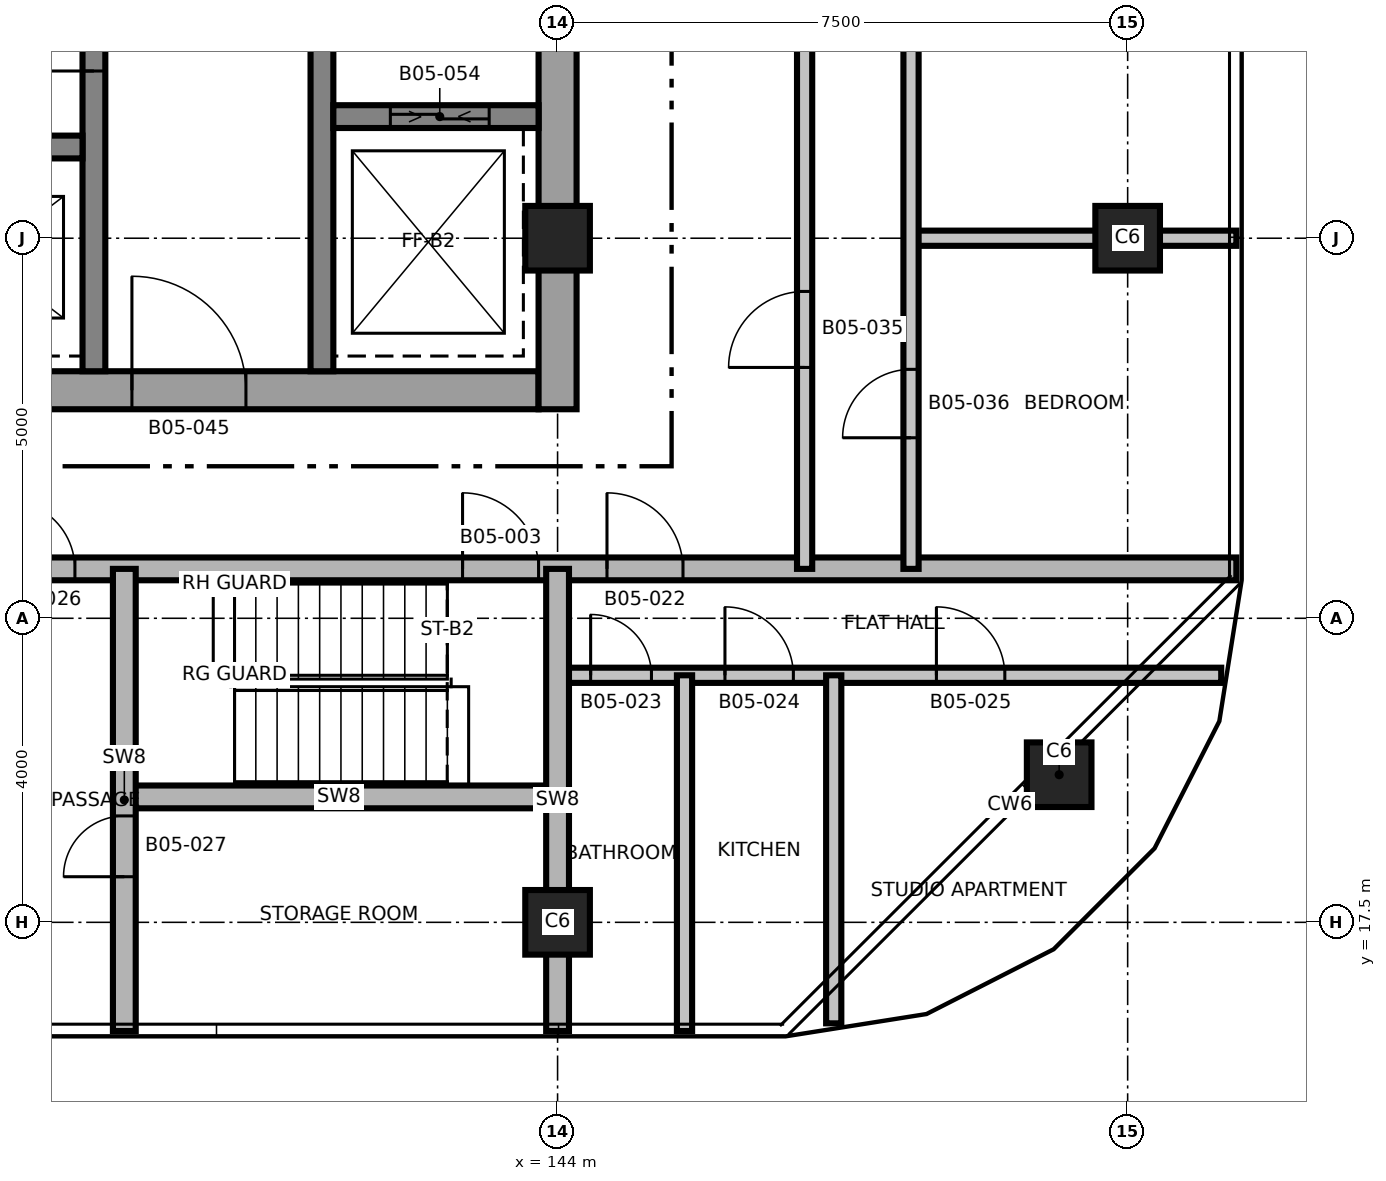
"""IFC4 building model, lengths in metres.
Left out: names, types, materials, properties, quantities, classifications, styles, units other than length and angle.
Written with IfcOpenShell. Run it as: python <this file> out.ifc"""

import sys

from ifc_helpers import new_model, si_unit, direction, frame, frame_2d, origin, origin_2d, place, context, subcontext, project, spatial, rectangle, extrude, element, fill, save


model = new_model("IFC4")
c1 = context("Model", 3, precision=1e-05, world=origin(), true_north=direction((0.0, 1.0)))
c2 = subcontext(c1, "Body", "Model", "MODEL_VIEW")
j1 = project(units=[si_unit("LENGTHUNIT", "METRE"), si_unit("PLANEANGLEUNIT", "RADIAN")], contexts=[c1])
p1 = place(None, origin())
s1 = spatial("IfcSite", under=j1, at=p1, CompositionType="ELEMENT")
p2 = place(p1, origin())
s2 = spatial("IfcBuilding", under=s1, at=p2, CompositionType="ELEMENT")
p3 = place(p2, frame((0.0, 0.0, 74.2)))
s3 = spatial("IfcBuildingStorey", under=s2, at=p3, CompositionType="ELEMENT", Elevation=74.2)
p4 = place(p3, frame((128.75, 24.5, 0.0), z_axis=(0.0, 0.0, 1.0), x_axis=(1.0, 0.0, 0.0)))
e1 = element("IfcWall", 1, at=p4, inside=s3, PredefinedType="SHEAR", context=c2, shape_type="SweptSolid", body=[
    extrude(rectangle(XDim=15.0, YDim=0.5, at=frame_2d((7.5, 0.0))), origin(), (0.0, 0.0, 1.0), 3.7),
])
p5 = place(p4, frame((9.65, 0.0, 0.0)))
e2 = element("IfcOpeningElement", 2, at=p5, cuts=e1, PredefinedType="OPENING", context=c2, shape_type="SweptSolid", body=[
    extrude(rectangle(XDim=1.5, YDim=2.1, at=frame_2d((0.75, 1.05))), frame((0.0, 0.26, 0.0), z_axis=(0.0, -1.0, 0.0), x_axis=(1.0, 0.0, 0.0)), (0.0, 0.0, 1.0), 0.52),
])
p6 = place(p4, frame((1.25, 0.0, 0.0)))
e3 = element("IfcOpeningElement", 3, at=p6, cuts=e1, PredefinedType="OPENING", context=c2, shape_type="SweptSolid", body=[
    extrude(rectangle(XDim=0.9, YDim=2.1, at=frame_2d((0.45, 1.05))), frame((0.0, 0.26, 0.0), z_axis=(0.0, -1.0, 0.0), x_axis=(1.0, 0.0, 0.0)), (0.0, 0.0, 1.0), 0.52),
])
p7 = place(p3, frame((144.0, 24.25, 0.0), z_axis=(0.0, 0.0, 1.0), x_axis=(0.0, 1.0, 0.0)))
e4 = element("IfcWall", 4, at=p7, inside=s3, PredefinedType="SHEAR", context=c2, shape_type="SweptSolid", body=[
    extrude(rectangle(XDim=13.5, YDim=0.5, at=frame_2d((6.75, 0.0))), origin(), (0.0, 0.0, 1.0), 3.7),
])
p8 = place(p3, frame((137.9, 24.75, 0.0), z_axis=(0.0, 0.0, 1.0), x_axis=(0.0, 1.0, 0.0)))
e5 = element("IfcWall", 5, at=p8, inside=s3, PredefinedType="SHEAR", context=c2, shape_type="SweptSolid", body=[
    extrude(rectangle(XDim=12.5, YDim=0.3, at=frame_2d((6.25, 0.0))), origin(), (0.0, 0.0, 1.0), 3.7),
])
p9 = place(p8, frame((3.95, 0.0, 0.0)))
e6 = element("IfcOpeningElement", 6, at=p9, cuts=e5, PredefinedType="OPENING", context=c2, shape_type="SweptSolid", body=[
    extrude(rectangle(XDim=1.5, YDim=2.1, at=frame_2d((0.75, 1.05))), frame((0.0, 0.16, 0.0), z_axis=(0.0, -1.0, 0.0), x_axis=(1.0, 0.0, 0.0)), (0.0, 0.0, 1.0), 0.32),
])
p10 = place(p8, frame((10.45, 0.0, 0.0)))
e7 = element("IfcOpeningElement", 7, at=p10, cuts=e5, PredefinedType="OPENING", context=c2, shape_type="SweptSolid", body=[
    extrude(rectangle(XDim=0.9, YDim=2.1, at=frame_2d((0.45, 1.05))), frame((0.0, 0.16, 0.0), z_axis=(0.0, -1.0, 0.0), x_axis=(1.0, 0.0, 0.0)), (0.0, 0.0, 1.0), 0.32),
])
p11 = place(p3, frame((140.9, 24.75, 0.0), z_axis=(0.0, 0.0, 1.0), x_axis=(0.0, 1.0, 0.0)))
e8 = element("IfcWall", 8, at=p11, inside=s3, PredefinedType="SHEAR", context=c2, shape_type="SweptSolid", body=[
    extrude(rectangle(XDim=12.5, YDim=0.3, at=frame_2d((6.25, 0.0))), origin(), (0.0, 0.0, 1.0), 3.7),
])
p12 = place(p11, frame((5.9, 0.0, 0.0)))
e9 = element("IfcOpeningElement", 9, at=p12, cuts=e8, PredefinedType="OPENING", context=c2, shape_type="SweptSolid", body=[
    extrude(rectangle(XDim=1.2, YDim=2.1, at=frame_2d((0.6, 1.05))), frame((0.0, 0.16, 0.0), z_axis=(0.0, -1.0, 0.0), x_axis=(1.0, 0.0, 0.0)), (0.0, 0.0, 1.0), 0.32),
])
p13 = place(p3, frame((132.25, 27.7, 0.0), z_axis=(0.0, 0.0, 1.0), x_axis=(1.0, 0.0, 0.0)))
e10 = element("IfcWall", 10, at=p13, inside=s3, PredefinedType="SHEAR", context=c2, shape_type="SweptSolid", body=[
    extrude(rectangle(XDim=5.5, YDim=0.3, at=frame_2d((2.75, 0.0))), origin(), (0.0, 0.0, 1.0), 3.7),
])
p14 = place(p13, frame((0.9, 0.0, 0.0)))
e11 = element("IfcOpeningElement", 11, at=p14, cuts=e10, PredefinedType="OPENING", context=c2, shape_type="SweptSolid", body=[
    extrude(rectangle(XDim=1.1, YDim=2.4, at=frame_2d((0.55, 1.2))), frame((0.0, 0.16, 0.0), z_axis=(0.0, -1.0, 0.0), x_axis=(1.0, 0.0, 0.0)), (0.0, 0.0, 1.0), 0.32),
])
p15 = place(p13, frame((3.8, 0.0, 0.0)))
e12 = element("IfcOpeningElement", 12, at=p15, cuts=e10, PredefinedType="OPENING", context=c2, shape_type="SweptSolid", body=[
    extrude(rectangle(XDim=1.1, YDim=2.4, at=frame_2d((0.55, 1.2))), frame((0.0, 0.16, 0.0), z_axis=(0.0, -1.0, 0.0), x_axis=(1.0, 0.0, 0.0)), (0.0, 0.0, 1.0), 0.32),
])
p16 = place(p3, frame((141.05, 28.1, 0.0), z_axis=(0.0, 0.0, 1.0), x_axis=(1.0, 0.0, 0.0)))
e13 = element("IfcWall", 13, at=p16, inside=s3, PredefinedType="SHEAR", context=c2, shape_type="SweptSolid", body=[
    extrude(rectangle(XDim=2.7, YDim=0.3, at=frame_2d((1.35, 0.0))), origin(), (0.0, 0.0, 1.0), 3.7),
])
p17 = place(p16, frame((0.75, 0.0, 0.0)))
e14 = element("IfcOpeningElement", 14, at=p17, cuts=e13, PredefinedType="OPENING", context=c2, shape_type="SweptSolid", body=[
    extrude(rectangle(XDim=1.3, YDim=2.4, at=frame_2d((0.65, 1.2))), frame((0.0, 0.16, 0.0), z_axis=(0.0, -1.0, 0.0), x_axis=(1.0, 0.0, 0.0)), (0.0, 0.0, 1.0), 0.32),
])
for number, where, z_axis, x_axis in (
    (15, (144.0, 17.5, 0.0), (0.0, 0.0, 1.0), (1.0, 0.0, 0.0)),
    (16, (150.599, 19.442, 0.0), (0.0, 0.0, 1.0), (1.0, 0.0, 0.0)),
    (17, (144.0, 26.5, 0.0), (0.0, 0.0, 1.0), (1.0, 0.0, 0.0)),
    (18, (151.5, 26.5, 0.0), (0.0, 0.0, 1.0), (1.0, 0.0, 0.0)),
):
    element("IfcColumn", number, at=place(p3, frame(where, z_axis=z_axis, x_axis=x_axis)), inside=s3, PredefinedType="COLUMN", context=c2, shape_type="SweptSolid", body=[
        extrude(rectangle(XDim=0.85, YDim=0.85, at=origin_2d()), origin(), (0.0, 0.0, 1.0), 3.7),
    ])
p18 = place(p3, frame((138.25, 19.15, 0.0), z_axis=(0.0, 0.0, 1.0), x_axis=(1.0, 0.0, 0.0)))
e19 = element("IfcWall", 19, at=p18, inside=s3, PredefinedType="SHEAR", context=c2, shape_type="SweptSolid", body=[
    extrude(rectangle(XDim=5.75, YDim=0.3, at=frame_2d((2.875, 0.0))), origin(), (0.0, 0.0, 1.0), 3.4),
])
p19 = place(p3, frame((144.0, 20.75, 0.0), z_axis=(0.0, 0.0, 1.0), x_axis=(1.0, 0.0, 0.0)))
e20 = element("IfcWall", 20, at=p19, inside=s3, PredefinedType="PARTITIONING", context=c2, shape_type="SweptSolid", body=[
    extrude(rectangle(XDim=8.731, YDim=0.2, at=frame_2d((4.365, 0.0))), origin(), (0.0, 0.0, 1.0), 3.4),
])
p20 = place(p19, frame((0.435, 0.0, 0.0)))
e21 = element("IfcOpeningElement", 21, at=p20, cuts=e20, PredefinedType="OPENING", context=c2, shape_type="SweptSolid", body=[
    extrude(rectangle(XDim=0.8, YDim=2.1, at=frame_2d((0.4, 1.05))), frame((0.0, 0.11, 0.0), z_axis=(0.0, -1.0, 0.0), x_axis=(1.0, 0.0, 0.0)), (0.0, 0.0, 1.0), 0.22),
])
p21 = place(p19, frame((2.202, 0.0, 0.0)))
e22 = element("IfcOpeningElement", 22, at=p21, cuts=e20, PredefinedType="OPENING", context=c2, shape_type="SweptSolid", body=[
    extrude(rectangle(XDim=0.9, YDim=2.1, at=frame_2d((0.45, 1.05))), frame((0.0, 0.11, 0.0), z_axis=(0.0, -1.0, 0.0), x_axis=(1.0, 0.0, 0.0)), (0.0, 0.0, 1.0), 0.22),
])
p22 = place(p19, frame((4.984, 0.0, 0.0)))
e23 = element("IfcOpeningElement", 23, at=p22, cuts=e20, PredefinedType="OPENING", context=c2, shape_type="SweptSolid", body=[
    extrude(rectangle(XDim=0.9, YDim=2.1, at=frame_2d((0.45, 1.05))), frame((0.0, 0.11, 0.0), z_axis=(0.0, -1.0, 0.0), x_axis=(1.0, 0.0, 0.0)), (0.0, 0.0, 1.0), 0.22),
])
p23 = place(p3, frame((120.07, 22.15, 0.0), z_axis=(0.0, 0.0, 1.0), x_axis=(1.0, 0.0, 0.0)))
e24 = element("IfcWall", 24, at=p23, inside=s3, PredefinedType="SHEAR", context=c2, shape_type="SweptSolid", body=[
    extrude(rectangle(XDim=32.86, YDim=0.3, at=frame_2d((16.43, 0.0))), origin(), (0.0, 0.0, 1.0), 3.4),
])
p24 = place(p23, frame((22.68, 0.0, 0.0)))
e25 = element("IfcOpeningElement", 25, at=p24, cuts=e24, PredefinedType="OPENING", context=c2, shape_type="SweptSolid", body=[
    extrude(rectangle(XDim=1.0, YDim=2.1, at=frame_2d((0.5, 1.05))), frame((0.0, 0.16, 0.0), z_axis=(0.0, -1.0, 0.0), x_axis=(1.0, 0.0, 0.0)), (0.0, 0.0, 1.0), 0.32),
])
p25 = place(p23, frame((11.03, 0.0, 0.0)))
e26 = element("IfcOpeningElement", 26, at=p25, cuts=e24, PredefinedType="OPENING", context=c2, shape_type="SweptSolid", body=[
    extrude(rectangle(XDim=1.0, YDim=2.1, at=frame_2d((0.5, 1.05))), frame((0.0, 0.16, 0.0), z_axis=(0.0, -1.0, 0.0), x_axis=(1.0, 0.0, 0.0)), (0.0, 0.0, 1.0), 0.32),
])
p26 = place(p23, frame((24.58, 0.0, 0.0)))
e27 = element("IfcOpeningElement", 27, at=p26, cuts=e24, PredefinedType="OPENING", context=c2, shape_type="SweptSolid", body=[
    extrude(rectangle(XDim=1.0, YDim=2.1, at=frame_2d((0.5, 1.05))), frame((0.0, 0.16, 0.0), z_axis=(0.0, -1.0, 0.0), x_axis=(1.0, 0.0, 0.0)), (0.0, 0.0, 1.0), 0.32),
])
p27 = place(p23, frame((16.68, 0.0, 0.0)))
e28 = element("IfcOpeningElement", 28, at=p27, cuts=e24, PredefinedType="OPENING", context=c2, shape_type="SweptSolid", body=[
    extrude(rectangle(XDim=0.9, YDim=2.1, at=frame_2d((0.45, 1.05))), frame((0.0, 0.16, 0.0), z_axis=(0.0, -1.0, 0.0), x_axis=(1.0, 0.0, 0.0)), (0.0, 0.0, 1.0), 0.32),
])
p28 = place(p3, frame((148.65, 26.5, 0.0), z_axis=(0.0, 0.0, 1.0), x_axis=(1.0, 0.0, 0.0)))
e29 = element("IfcWall", 29, at=p28, inside=s3, PredefinedType="PARTITIONING", context=c2, shape_type="SweptSolid", body=[
    extrude(rectangle(XDim=4.28, YDim=0.2, at=frame_2d((2.14, 0.0))), origin(), (0.0, 0.0, 1.0), 3.4),
])
p29 = place(p3, frame((138.3, 16.07, 0.0), z_axis=(0.0, 0.0, 1.0), x_axis=(0.0, 1.0, 0.0)))
e30 = element("IfcWall", 30, at=p29, inside=s3, PredefinedType="SHEAR", context=c2, shape_type="SweptSolid", body=[
    extrude(rectangle(XDim=6.08, YDim=0.3, at=frame_2d((3.04, 0.0))), origin(), (0.0, 0.0, 1.0), 3.4),
])
p30 = place(p29, frame((2.03, 0.0, 0.0)))
e31 = element("IfcOpeningElement", 31, at=p30, cuts=e30, PredefinedType="OPENING", context=c2, shape_type="SweptSolid", body=[
    extrude(rectangle(XDim=0.8, YDim=2.1, at=frame_2d((0.4, 1.05))), frame((0.0, 0.16, 0.0), z_axis=(0.0, -1.0, 0.0), x_axis=(1.0, 0.0, 0.0)), (0.0, 0.0, 1.0), 0.32),
])
p31 = place(p3, frame((144.0, 16.07, 0.0), z_axis=(0.0, 0.0, 1.0), x_axis=(0.0, 1.0, 0.0)))
e32 = element("IfcWall", 32, at=p31, inside=s3, PredefinedType="SHEAR", context=c2, shape_type="SweptSolid", body=[
    extrude(rectangle(XDim=6.08, YDim=0.3, at=frame_2d((3.04, 0.0))), origin(), (0.0, 0.0, 1.0), 3.4),
])
p32 = place(p3, frame((145.67, 16.07, 0.0), z_axis=(0.0, 0.0, 1.0), x_axis=(0.0, 1.0, 0.0)))
e33 = element("IfcWall", 33, at=p32, inside=s3, PredefinedType="PARTITIONING", context=c2, shape_type="SweptSolid", body=[
    extrude(rectangle(XDim=4.68, YDim=0.2, at=frame_2d((2.34, 0.0))), origin(), (0.0, 0.0, 1.0), 3.4),
])
p33 = place(p3, frame((147.25, 22.15, 0.0), z_axis=(0.0, 0.0, 1.0), x_axis=(0.0, 1.0, 0.0)))
e34 = element("IfcWall", 34, at=p33, inside=s3, PredefinedType="PARTITIONING", context=c2, shape_type="SweptSolid", body=[
    extrude(rectangle(XDim=17.7, YDim=0.2, at=frame_2d((8.85, 0.0))), origin(), (0.0, 0.0, 1.0), 3.4),
])
p34 = place(p33, frame((2.65, 0.0, 0.0)))
e35 = element("IfcOpeningElement", 35, at=p34, cuts=e34, PredefinedType="OPENING", context=c2, shape_type="SweptSolid", body=[
    extrude(rectangle(XDim=1.0, YDim=2.1, at=frame_2d((0.5, 1.05))), frame((0.0, 0.11, 0.0), z_axis=(0.0, -1.0, 0.0), x_axis=(1.0, 0.0, 0.0)), (0.0, 0.0, 1.0), 0.22),
])
p35 = place(p3, frame((147.633, 16.171, 0.0), z_axis=(0.0, 0.0, 1.0), x_axis=(0.0, 1.0, 0.0)))
e36 = element("IfcWall", 36, at=p35, inside=s3, PredefinedType="PARTITIONING", context=c2, shape_type="SweptSolid", body=[
    extrude(rectangle(XDim=4.579, YDim=0.2, at=frame_2d((2.29, 0.0))), origin(), (0.0, 0.0, 1.0), 3.4),
])
p36 = place(p3, frame((148.65, 22.15, 0.0), z_axis=(0.0, 0.0, 1.0), x_axis=(0.0, 1.0, 0.0)))
e37 = element("IfcWall", 37, at=p36, inside=s3, PredefinedType="PARTITIONING", context=c2, shape_type="SweptSolid", body=[
    extrude(rectangle(XDim=17.7, YDim=0.2, at=frame_2d((8.85, 0.0))), origin(), (0.0, 0.0, 1.0), 3.4),
])
p37 = place(p36, frame((1.725, 0.0, 0.0)))
e38 = element("IfcOpeningElement", 38, at=p37, cuts=e37, PredefinedType="OPENING", context=c2, shape_type="SweptSolid", body=[
    extrude(rectangle(XDim=0.9, YDim=2.1, at=frame_2d((0.45, 1.05))), frame((0.0, 0.11, 0.0), z_axis=(0.0, -1.0, 0.0), x_axis=(1.0, 0.0, 0.0)), (0.0, 0.0, 1.0), 0.22),
])
p38 = place(p36, frame((6.867, 0.0, 0.0)))
e39 = element("IfcOpeningElement", 39, at=p38, cuts=e37, PredefinedType="OPENING", context=c2, shape_type="SweptSolid", body=[
    extrude(rectangle(XDim=0.9, YDim=2.1, at=frame_2d((0.45, 1.05))), frame((0.0, 0.11, 0.0), z_axis=(0.0, -1.0, 0.0), x_axis=(1.0, 0.0, 0.0)), (0.0, 0.0, 1.0), 0.22),
])
p39 = place(p36, frame((11.367, 0.0, 0.0)))
e40 = element("IfcOpeningElement", 40, at=p39, cuts=e37, PredefinedType="OPENING", context=c2, shape_type="SweptSolid", body=[
    extrude(rectangle(XDim=0.9, YDim=2.1, at=frame_2d((0.45, 1.05))), frame((0.0, 0.11, 0.0), z_axis=(0.0, -1.0, 0.0), x_axis=(1.0, 0.0, 0.0)), (0.0, 0.0, 1.0), 0.22),
])
p40 = place(p36, frame((14.378, 0.0, 0.0)))
e41 = element("IfcOpeningElement", 41, at=p40, cuts=e37, PredefinedType="OPENING", context=c2, shape_type="SweptSolid", body=[
    extrude(rectangle(XDim=0.9, YDim=2.1, at=frame_2d((0.45, 1.05))), frame((0.0, 0.11, 0.0), z_axis=(0.0, -1.0, 0.0), x_axis=(1.0, 0.0, 0.0)), (0.0, 0.0, 1.0), 0.22),
])
p41 = place(p36, frame((16.603, 0.0, 0.0)))
e42 = element("IfcOpeningElement", 42, at=p41, cuts=e37, PredefinedType="OPENING", context=c2, shape_type="SweptSolid", body=[
    extrude(rectangle(XDim=0.8, YDim=2.1, at=frame_2d((0.4, 1.05))), frame((0.0, 0.11, 0.0), z_axis=(0.0, -1.0, 0.0), x_axis=(1.0, 0.0, 0.0)), (0.0, 0.0, 1.0), 0.22),
])
p42 = place(p24, origin())
e43 = element("IfcDoor", 43, at=p42, inside=s3, OperationType="SINGLE_SWING_LEFT", PredefinedType="DOOR", context=c2, shape_type="SweptSolid", body=[
    extrude(rectangle(XDim=1.0, YDim=2.1, at=frame_2d((0.5, 1.05))), frame((0.0, 0.025, 0.0), z_axis=(0.0, -1.0, 0.0), x_axis=(1.0, 0.0, 0.0)), (0.0, 0.0, 1.0), 0.05),
])
fill(e25, e43)
p43 = place(p26, origin())
e44 = element("IfcDoor", 44, at=p43, inside=s3, OperationType="SINGLE_SWING_RIGHT", PredefinedType="DOOR", context=c2, shape_type="SweptSolid", body=[
    extrude(rectangle(XDim=1.0, YDim=2.1, at=frame_2d((0.5, 1.05))), frame((0.0, 0.025, 0.0), z_axis=(0.0, -1.0, 0.0), x_axis=(1.0, 0.0, 0.0)), (0.0, 0.0, 1.0), 0.05),
])
fill(e27, e44)
p44 = place(p20, origin())
e45 = element("IfcDoor", 45, at=p44, inside=s3, OperationType="SINGLE_SWING_LEFT", PredefinedType="DOOR", context=c2, shape_type="SweptSolid", body=[
    extrude(rectangle(XDim=0.8, YDim=2.1, at=frame_2d((0.4, 1.05))), frame((0.0, 0.025, 0.0), z_axis=(0.0, -1.0, 0.0), x_axis=(1.0, 0.0, 0.0)), (0.0, 0.0, 1.0), 0.05),
])
fill(e21, e45)
p45 = place(p21, origin())
e46 = element("IfcDoor", 46, at=p45, inside=s3, OperationType="SINGLE_SWING_RIGHT", PredefinedType="DOOR", context=c2, shape_type="SweptSolid", body=[
    extrude(rectangle(XDim=0.9, YDim=2.1, at=frame_2d((0.45, 1.05))), frame((0.0, 0.025, 0.0), z_axis=(0.0, -1.0, 0.0), x_axis=(1.0, 0.0, 0.0)), (0.0, 0.0, 1.0), 0.05),
])
fill(e22, e46)
p46 = place(p22, origin())
e47 = element("IfcDoor", 47, at=p46, inside=s3, OperationType="SINGLE_SWING_LEFT", PredefinedType="DOOR", context=c2, shape_type="SweptSolid", body=[
    extrude(rectangle(XDim=0.9, YDim=2.1, at=frame_2d((0.45, 1.05))), frame((0.0, 0.025, 0.0), z_axis=(0.0, -1.0, 0.0), x_axis=(1.0, 0.0, 0.0)), (0.0, 0.0, 1.0), 0.05),
])
fill(e23, e47)
p47 = place(p27, origin())
e48 = element("IfcDoor", 48, at=p47, inside=s3, OperationType="SINGLE_SWING_RIGHT", PredefinedType="DOOR", context=c2, shape_type="SweptSolid", body=[
    extrude(rectangle(XDim=0.9, YDim=2.1, at=frame_2d((0.45, 1.05))), frame((0.0, 0.025, 0.0), z_axis=(0.0, -1.0, 0.0), x_axis=(1.0, 0.0, 0.0)), (0.0, 0.0, 1.0), 0.05),
])
fill(e28, e48)
p48 = place(p30, origin())
e49 = element("IfcDoor", 49, at=p48, inside=s3, OperationType="SINGLE_SWING_LEFT", PredefinedType="DOOR", context=c2, shape_type="SweptSolid", body=[
    extrude(rectangle(XDim=0.8, YDim=2.1, at=frame_2d((0.4, 1.05))), frame((0.0, 0.025, 0.0), z_axis=(0.0, -1.0, 0.0), x_axis=(1.0, 0.0, 0.0)), (0.0, 0.0, 1.0), 0.05),
])
fill(e31, e49)
p49 = place(p34, origin())
e50 = element("IfcDoor", 50, at=p49, inside=s3, OperationType="SINGLE_SWING_LEFT", PredefinedType="DOOR", context=c2, shape_type="SweptSolid", body=[
    extrude(rectangle(XDim=1.0, YDim=2.1, at=frame_2d((0.5, 1.05))), frame((0.0, 0.025, 0.0), z_axis=(0.0, -1.0, 0.0), x_axis=(1.0, 0.0, 0.0)), (0.0, 0.0, 1.0), 0.05),
])
fill(e35, e50)
p50 = place(p37, origin())
e51 = element("IfcDoor", 51, at=p50, inside=s3, OperationType="SINGLE_SWING_RIGHT", PredefinedType="DOOR", context=c2, shape_type="SweptSolid", body=[
    extrude(rectangle(XDim=0.9, YDim=2.1, at=frame_2d((0.45, 1.05))), frame((0.0, 0.025, 0.0), z_axis=(0.0, -1.0, 0.0), x_axis=(1.0, 0.0, 0.0)), (0.0, 0.0, 1.0), 0.05),
])
fill(e38, e51)
p51 = place(p9, origin())
e52 = element("IfcDoor", 52, at=p51, inside=s3, OperationType="SINGLE_SWING_RIGHT", PredefinedType="DOOR", context=c2, shape_type="SweptSolid", body=[
    extrude(rectangle(XDim=1.5, YDim=2.1, at=frame_2d((0.75, 1.05))), frame((0.0, 0.025, 0.0), z_axis=(0.0, -1.0, 0.0), x_axis=(1.0, 0.0, 0.0)), (0.0, 0.0, 1.0), 0.05),
])
fill(e6, e52)
p52 = place(p5, origin())
e53 = element("IfcDoor", 53, at=p52, inside=s3, OperationType="SINGLE_SWING_LEFT", PredefinedType="DOOR", context=c2, shape_type="SweptSolid", body=[
    extrude(rectangle(XDim=1.5, YDim=2.1, at=frame_2d((0.75, 1.05))), frame((0.0, 0.025, 0.0), z_axis=(0.0, -1.0, 0.0), x_axis=(1.0, 0.0, 0.0)), (0.0, 0.0, 1.0), 0.05),
])
fill(e2, e53)
p53 = place(p17, origin())
e54 = element("IfcDoor", 54, at=p53, inside=s3, OperationType="SLIDING_TO_LEFT", PredefinedType="DOOR", context=c2, shape_type="SweptSolid", body=[
    extrude(rectangle(XDim=1.3, YDim=2.4, at=frame_2d((0.65, 1.2))), frame((0.0, 0.025, 0.0), z_axis=(0.0, -1.0, 0.0), x_axis=(1.0, 0.0, 0.0)), (0.0, 0.0, 1.0), 0.05),
])
fill(e14, e54)
save(model, sys.argv[1])
